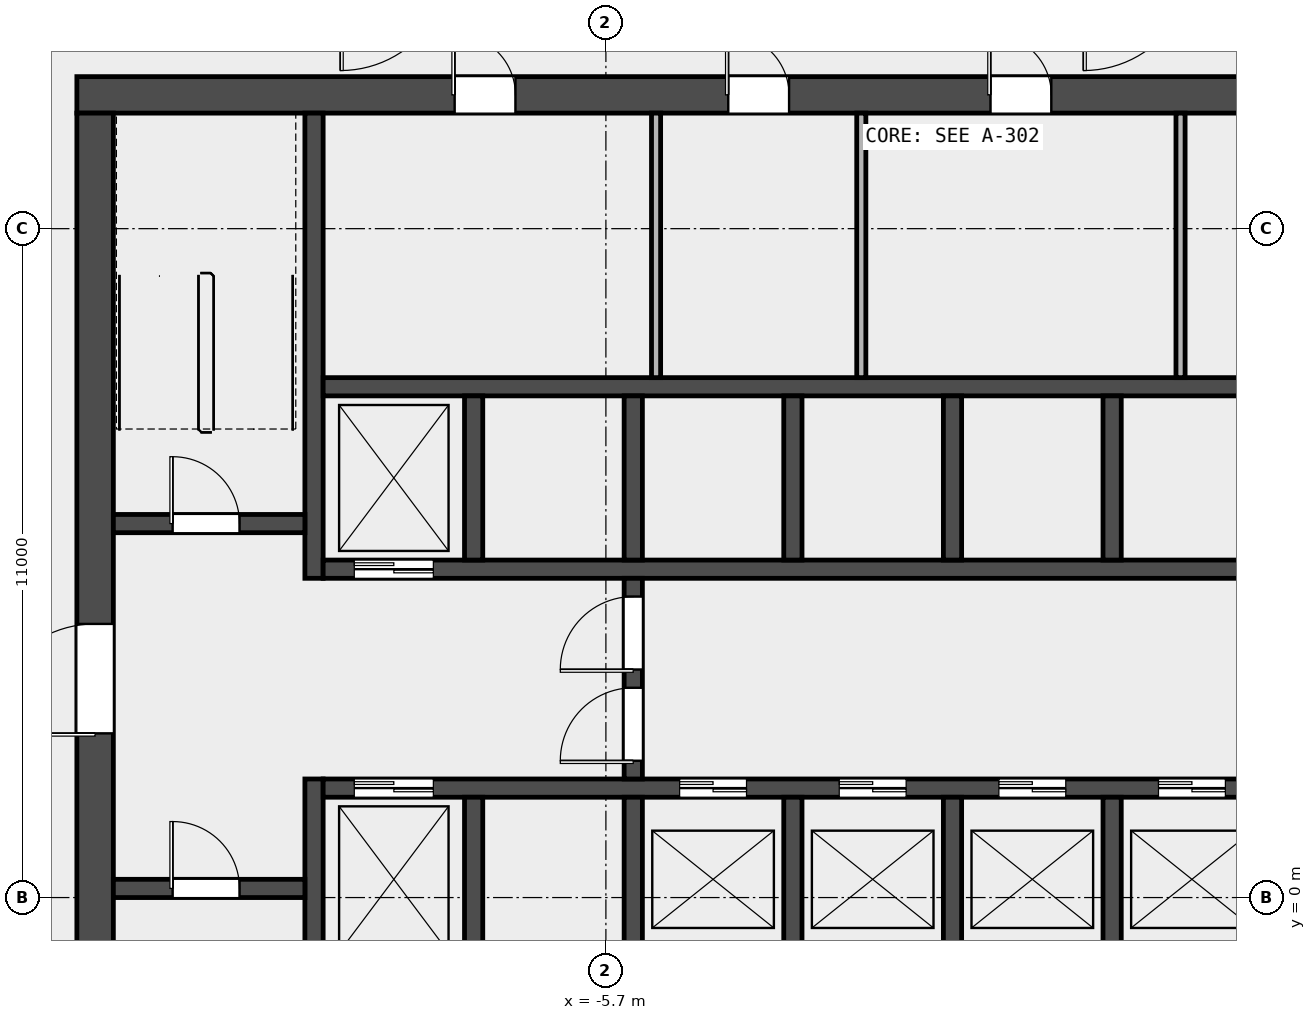
"""IFC4 building model, lengths in metres.
Left out: names, types, materials, properties, quantities, classifications, styles, units other than length and angle.
Written with IfcOpenShell. Run it as: python <this file> out.ifc"""

import sys

from ifc_helpers import new_model, si_unit, direction, frame, frame_2d, origin, place, context, subcontext, project, spatial, rectangle, extrude, element, fill, save


model = new_model("IFC4")
c1 = context("Model", 3, precision=1e-05, world=origin(), true_north=direction((0.0, 1.0)))
c2 = subcontext(c1, "Body", "Model", "MODEL_VIEW")
j1 = project(units=[si_unit("LENGTHUNIT", "METRE"), si_unit("PLANEANGLEUNIT", "RADIAN")], contexts=[c1])
p1 = place(None, origin())
s1 = spatial("IfcSite", under=j1, at=p1, CompositionType="ELEMENT")
p2 = place(p1, origin())
s2 = spatial("IfcBuilding", under=s1, at=p2, CompositionType="ELEMENT")
p3 = place(p2, frame((0.0, 0.0, 9.0)))
s3 = spatial("IfcBuildingStorey", under=s2, at=p3, CompositionType="ELEMENT", Elevation=9.0)
p4 = place(p3, frame((-14.4, 13.2, 0.0), z_axis=(0.0, 0.0, 1.0), x_axis=(1.0, 0.0, 0.0)))
e1 = element("IfcWall", 1, at=p4, inside=s3, PredefinedType="SHEAR", context=c2, shape_type="SweptSolid", body=[
    extrude(rectangle(XDim=28.8, YDim=0.6, at=frame_2d((14.4, 0.0))), origin(), (0.0, 0.0, 1.0), 5.2),
])
p5 = place(p4, frame((6.212, 0.0, 0.0)))
e2 = element("IfcOpeningElement", 2, at=p5, cuts=e1, PredefinedType="OPENING", context=c2, shape_type="SweptSolid", body=[
    extrude(rectangle(XDim=1.0, YDim=2.1, at=frame_2d((0.5, 1.05))), frame((0.0, 0.312, 0.0), z_axis=(0.0, -1.0, 0.0), x_axis=(1.0, 0.0, 0.0)), (0.0, 0.0, 1.0), 0.624),
])
p6 = place(p4, frame((10.712, 0.0, 0.0)))
e3 = element("IfcOpeningElement", 3, at=p6, cuts=e1, PredefinedType="OPENING", context=c2, shape_type="SweptSolid", body=[
    extrude(rectangle(XDim=1.0, YDim=2.1, at=frame_2d((0.5, 1.05))), frame((0.0, 0.312, 0.0), z_axis=(0.0, -1.0, 0.0), x_axis=(1.0, 0.0, 0.0)), (0.0, 0.0, 1.0), 0.624),
])
p7 = place(p4, frame((15.025, 0.0, 0.0)))
e4 = element("IfcOpeningElement", 4, at=p7, cuts=e1, PredefinedType="OPENING", context=c2, shape_type="SweptSolid", body=[
    extrude(rectangle(XDim=1.0, YDim=2.1, at=frame_2d((0.5, 1.05))), frame((0.0, 0.312, 0.0), z_axis=(0.0, -1.0, 0.0), x_axis=(1.0, 0.0, 0.0)), (0.0, 0.0, 1.0), 0.624),
])
p8 = place(p4, frame((21.025, 0.0, 0.0)))
e5 = element("IfcOpeningElement", 5, at=p8, cuts=e1, PredefinedType="OPENING", context=c2, shape_type="SweptSolid", body=[
    extrude(rectangle(XDim=1.0, YDim=2.1, at=frame_2d((0.5, 1.05))), frame((0.0, 0.312, 0.0), z_axis=(0.0, -1.0, 0.0), x_axis=(1.0, 0.0, 0.0)), (0.0, 0.0, 1.0), 0.624),
])
p9 = place(p3, frame((-14.1, -6.6, 0.0), z_axis=(0.0, 0.0, 1.0), x_axis=(0.0, 1.0, 0.0)))
e6 = element("IfcWall", 6, at=p9, inside=s3, PredefinedType="SHEAR", context=c2, shape_type="SweptSolid", body=[
    extrude(rectangle(XDim=19.5, YDim=0.6, at=frame_2d((9.75, 0.0))), origin(), (0.0, 0.0, 1.0), 5.2),
])
p10 = place(p9, frame((9.3, 0.0, 0.0)))
e7 = element("IfcOpeningElement", 7, at=p10, cuts=e6, PredefinedType="OPENING", context=c2, shape_type="SweptSolid", body=[
    extrude(rectangle(XDim=1.8, YDim=2.1, at=frame_2d((0.9, 1.05))), frame((0.0, 0.312, 0.0), z_axis=(0.0, -1.0, 0.0), x_axis=(1.0, 0.0, 0.0)), (0.0, 0.0, 1.0), 0.624),
])
p11 = place(p3, frame((-10.5, -6.6, 0.0), z_axis=(0.0, 0.0, 1.0), x_axis=(0.0, 1.0, 0.0)))
e8 = element("IfcWall", 8, at=p11, inside=s3, PredefinedType="SHEAR", context=c2, shape_type="SweptSolid", body=[
    extrude(rectangle(XDim=8.55, YDim=0.3, at=frame_2d((4.275, 0.0))), origin(), (0.0, 0.0, 1.0), 5.2),
])
p12 = place(p3, frame((-10.5, 5.25, 0.0), z_axis=(0.0, 0.0, 1.0), x_axis=(0.0, 1.0, 0.0)))
e9 = element("IfcWall", 9, at=p12, inside=s3, PredefinedType="SHEAR", context=c2, shape_type="SweptSolid", body=[
    extrude(rectangle(XDim=7.65, YDim=0.3, at=frame_2d((3.825, 0.0))), origin(), (0.0, 0.0, 1.0), 5.2),
])
p13 = place(p3, frame((-13.8, 0.15, 0.0), z_axis=(0.0, 0.0, 1.0), x_axis=(1.0, 0.0, 0.0)))
e10 = element("IfcWall", 10, at=p13, inside=s3, PredefinedType="SOLIDWALL", context=c2, shape_type="SweptSolid", body=[
    extrude(rectangle(XDim=3.15, YDim=0.3, at=frame_2d((1.575, 0.0))), origin(), (0.0, 0.0, 1.0), 5.2),
])
p14 = place(p13, frame((0.975, 0.0, 0.0)))
e11 = element("IfcOpeningElement", 11, at=p14, cuts=e10, PredefinedType="OPENING", context=c2, shape_type="SweptSolid", body=[
    extrude(rectangle(XDim=1.1, YDim=2.1, at=frame_2d((0.55, 1.05))), frame((0.0, 0.162, 0.0), z_axis=(0.0, -1.0, 0.0), x_axis=(1.0, 0.0, 0.0)), (0.0, 0.0, 1.0), 0.324),
])
p15 = place(p3, frame((-13.8, 6.15, 0.0), z_axis=(0.0, 0.0, 1.0), x_axis=(1.0, 0.0, 0.0)))
e12 = element("IfcWall", 12, at=p15, inside=s3, PredefinedType="SOLIDWALL", context=c2, shape_type="SweptSolid", body=[
    extrude(rectangle(XDim=3.15, YDim=0.3, at=frame_2d((1.575, 0.0))), origin(), (0.0, 0.0, 1.0), 5.2),
])
p16 = place(p15, frame((0.975, 0.0, 0.0)))
e13 = element("IfcOpeningElement", 13, at=p16, cuts=e12, PredefinedType="OPENING", context=c2, shape_type="SweptSolid", body=[
    extrude(rectangle(XDim=1.1, YDim=2.1, at=frame_2d((0.55, 1.05))), frame((0.0, 0.162, 0.0), z_axis=(0.0, -1.0, 0.0), x_axis=(1.0, 0.0, 0.0)), (0.0, 0.0, 1.0), 0.324),
])
p17 = place(p3, frame((-10.35, 1.8, 0.0), z_axis=(0.0, 0.0, 1.0), x_axis=(1.0, 0.0, 0.0)))
e14 = element("IfcWall", 14, at=p17, inside=s3, PredefinedType="SOLIDWALL", context=c2, shape_type="SweptSolid", body=[
    extrude(rectangle(XDim=20.7, YDim=0.3, at=frame_2d((10.35, 0.0))), origin(), (0.0, 0.0, 1.0), 5.2),
])
p18 = place(p17, frame((0.512, 0.0, 0.0)))
e15 = element("IfcOpeningElement", 15, at=p18, cuts=e14, PredefinedType="OPENING", context=c2, shape_type="SweptSolid", body=[
    extrude(rectangle(XDim=1.3, YDim=2.1, at=frame_2d((0.65, 1.05))), frame((0.0, 0.162, 0.0), z_axis=(0.0, -1.0, 0.0), x_axis=(1.0, 0.0, 0.0)), (0.0, 0.0, 1.0), 0.324),
])
p19 = place(p17, frame((5.863, 0.0, 0.0)))
e16 = element("IfcOpeningElement", 16, at=p19, cuts=e14, PredefinedType="OPENING", context=c2, shape_type="SweptSolid", body=[
    extrude(rectangle(XDim=1.1, YDim=2.1, at=frame_2d((0.55, 1.05))), frame((0.0, 0.162, 0.0), z_axis=(0.0, -1.0, 0.0), x_axis=(1.0, 0.0, 0.0)), (0.0, 0.0, 1.0), 0.324),
])
p20 = place(p17, frame((8.488, 0.0, 0.0)))
e17 = element("IfcOpeningElement", 17, at=p20, cuts=e14, PredefinedType="OPENING", context=c2, shape_type="SweptSolid", body=[
    extrude(rectangle(XDim=1.1, YDim=2.1, at=frame_2d((0.55, 1.05))), frame((0.0, 0.162, 0.0), z_axis=(0.0, -1.0, 0.0), x_axis=(1.0, 0.0, 0.0)), (0.0, 0.0, 1.0), 0.324),
])
p21 = place(p17, frame((11.113, 0.0, 0.0)))
e18 = element("IfcOpeningElement", 18, at=p21, cuts=e14, PredefinedType="OPENING", context=c2, shape_type="SweptSolid", body=[
    extrude(rectangle(XDim=1.1, YDim=2.1, at=frame_2d((0.55, 1.05))), frame((0.0, 0.162, 0.0), z_axis=(0.0, -1.0, 0.0), x_axis=(1.0, 0.0, 0.0)), (0.0, 0.0, 1.0), 0.324),
])
p22 = place(p17, frame((13.738, 0.0, 0.0)))
e19 = element("IfcOpeningElement", 19, at=p22, cuts=e14, PredefinedType="OPENING", context=c2, shape_type="SweptSolid", body=[
    extrude(rectangle(XDim=1.1, YDim=2.1, at=frame_2d((0.55, 1.05))), frame((0.0, 0.162, 0.0), z_axis=(0.0, -1.0, 0.0), x_axis=(1.0, 0.0, 0.0)), (0.0, 0.0, 1.0), 0.324),
])
p23 = place(p17, frame((16.363, 0.0, 0.0)))
e20 = element("IfcOpeningElement", 20, at=p23, cuts=e14, PredefinedType="OPENING", context=c2, shape_type="SweptSolid", body=[
    extrude(rectangle(XDim=1.1, YDim=2.1, at=frame_2d((0.55, 1.05))), frame((0.0, 0.162, 0.0), z_axis=(0.0, -1.0, 0.0), x_axis=(1.0, 0.0, 0.0)), (0.0, 0.0, 1.0), 0.324),
])
p24 = place(p17, frame((18.988, 0.0, 0.0)))
e21 = element("IfcOpeningElement", 21, at=p24, cuts=e14, PredefinedType="OPENING", context=c2, shape_type="SweptSolid", body=[
    extrude(rectangle(XDim=1.1, YDim=2.1, at=frame_2d((0.55, 1.05))), frame((0.0, 0.162, 0.0), z_axis=(0.0, -1.0, 0.0), x_axis=(1.0, 0.0, 0.0)), (0.0, 0.0, 1.0), 0.324),
])
p25 = place(p3, frame((-10.35, 5.4, 0.0), z_axis=(0.0, 0.0, 1.0), x_axis=(1.0, 0.0, 0.0)))
e22 = element("IfcWall", 22, at=p25, inside=s3, PredefinedType="SOLIDWALL", context=c2, shape_type="SweptSolid", body=[
    extrude(rectangle(XDim=20.7, YDim=0.3, at=frame_2d((10.35, 0.0))), origin(), (0.0, 0.0, 1.0), 5.2),
])
p26 = place(p25, frame((0.512, 0.0, 0.0)))
e23 = element("IfcOpeningElement", 23, at=p26, cuts=e22, PredefinedType="OPENING", context=c2, shape_type="SweptSolid", body=[
    extrude(rectangle(XDim=1.3, YDim=2.1, at=frame_2d((0.65, 1.05))), frame((0.0, 0.162, 0.0), z_axis=(0.0, -1.0, 0.0), x_axis=(1.0, 0.0, 0.0)), (0.0, 0.0, 1.0), 0.324),
])
p27 = place(p3, frame((-10.35, 8.4, 0.0), z_axis=(0.0, 0.0, 1.0), x_axis=(1.0, 0.0, 0.0)))
e24 = element("IfcWall", 24, at=p27, inside=s3, PredefinedType="SOLIDWALL", context=c2, shape_type="SweptSolid", body=[
    extrude(rectangle(XDim=20.7, YDim=0.3, at=frame_2d((10.35, 0.0))), origin(), (0.0, 0.0, 1.0), 5.2),
])
for number, where, z_axis, x_axis in (
    (25, (-7.875, -1.05, 0.0), (0.0, 0.0, 1.0), (0.0, 1.0, 0.0)),
    (26, (-5.25, -1.05, 0.0), (0.0, 0.0, 1.0), (0.0, 1.0, 0.0)),
    (27, (-2.625, -1.05, 0.0), (0.0, 0.0, 1.0), (0.0, 1.0, 0.0)),
    (28, (0.0, -1.05, 0.0), (0.0, 0.0, 1.0), (0.0, 1.0, 0.0)),
    (29, (2.625, -1.05, 0.0), (0.0, 0.0, 1.0), (0.0, 1.0, 0.0)),
    (30, (-7.875, 5.55, 0.0), (0.0, 0.0, 1.0), (0.0, 1.0, 0.0)),
    (31, (-5.25, 5.55, 0.0), (0.0, 0.0, 1.0), (0.0, 1.0, 0.0)),
    (32, (-2.625, 5.55, 0.0), (0.0, 0.0, 1.0), (0.0, 1.0, 0.0)),
    (33, (0.0, 5.55, 0.0), (0.0, 0.0, 1.0), (0.0, 1.0, 0.0)),
    (34, (2.625, 5.55, 0.0), (0.0, 0.0, 1.0), (0.0, 1.0, 0.0)),
):
    element("IfcWall", number, at=place(p3, frame(where, z_axis=z_axis, x_axis=x_axis)), inside=s3, PredefinedType="SOLIDWALL", context=c2, shape_type="SweptSolid", body=[
        extrude(rectangle(XDim=2.7, YDim=0.3, at=frame_2d((1.35, 0.0))), origin(), (0.0, 0.0, 1.0), 5.2),
    ])
p28 = place(p3, frame((-5.25, 1.95, 0.0), z_axis=(0.0, 0.0, 1.0), x_axis=(0.0, 1.0, 0.0)))
e35 = element("IfcWall", 35, at=p28, inside=s3, PredefinedType="SOLIDWALL", context=c2, shape_type="SweptSolid", body=[
    extrude(rectangle(XDim=3.3, YDim=0.3, at=frame_2d((1.65, 0.0))), origin(), (0.0, 0.0, 1.0), 5.2),
])
p29 = place(p28, frame((0.3, 0.0, 0.0)))
e36 = element("IfcOpeningElement", 36, at=p29, cuts=e35, PredefinedType="OPENING", context=c2, shape_type="SweptSolid", body=[
    extrude(rectangle(XDim=1.2, YDim=2.1, at=frame_2d((0.6, 1.05))), frame((0.0, 0.162, 0.0), z_axis=(0.0, -1.0, 0.0), x_axis=(1.0, 0.0, 0.0)), (0.0, 0.0, 1.0), 0.324),
])
p30 = place(p28, frame((1.8, 0.0, 0.0)))
e37 = element("IfcOpeningElement", 37, at=p30, cuts=e35, PredefinedType="OPENING", context=c2, shape_type="SweptSolid", body=[
    extrude(rectangle(XDim=1.2, YDim=2.1, at=frame_2d((0.6, 1.05))), frame((0.0, 0.162, 0.0), z_axis=(0.0, -1.0, 0.0), x_axis=(1.0, 0.0, 0.0)), (0.0, 0.0, 1.0), 0.324),
])
for number, where, z_axis, x_axis in (
    (38, (-4.875, 8.55, 0.0), (0.0, 0.0, 1.0), (0.0, 1.0, 0.0)),
    (39, (-1.5, 8.55, 0.0), (0.0, 0.0, 1.0), (0.0, 1.0, 0.0)),
    (40, (3.75, 8.55, 0.0), (0.0, 0.0, 1.0), (0.0, 1.0, 0.0)),
):
    element("IfcWall", number, at=place(p3, frame(where, z_axis=z_axis, x_axis=x_axis)), inside=s3, PredefinedType="PARTITIONING", context=c2, shape_type="SweptSolid", body=[
        extrude(rectangle(XDim=4.35, YDim=0.15, at=frame_2d((2.175, 0.0))), origin(), (0.0, 0.0, 1.0), 5.2),
    ])
p31 = place(p14, origin())
e41 = element("IfcDoor", 41, at=p31, inside=s3, OperationType="SINGLE_SWING_LEFT", PredefinedType="DOOR", context=c2, shape_type="SweptSolid", body=[
    extrude(rectangle(XDim=1.1, YDim=2.1, at=frame_2d((0.55, 1.05))), frame((0.0, 0.025, 0.0), z_axis=(0.0, -1.0, 0.0), x_axis=(1.0, 0.0, 0.0)), (0.0, 0.0, 1.0), 0.05),
])
fill(e11, e41)
p32 = place(p16, origin())
e42 = element("IfcDoor", 42, at=p32, inside=s3, OperationType="SINGLE_SWING_LEFT", PredefinedType="DOOR", context=c2, shape_type="SweptSolid", body=[
    extrude(rectangle(XDim=1.1, YDim=2.1, at=frame_2d((0.55, 1.05))), frame((0.0, 0.025, 0.0), z_axis=(0.0, -1.0, 0.0), x_axis=(1.0, 0.0, 0.0)), (0.0, 0.0, 1.0), 0.05),
])
fill(e13, e42)
p33 = place(p10, origin())
e43 = element("IfcDoor", 43, at=p33, inside=s3, OperationType="DOUBLE_DOOR_SINGLE_SWING", PredefinedType="DOOR", context=c2, shape_type="SweptSolid", body=[
    extrude(rectangle(XDim=1.8, YDim=2.1, at=frame_2d((0.9, 1.05))), frame((0.0, 0.025, 0.0), z_axis=(0.0, -1.0, 0.0), x_axis=(1.0, 0.0, 0.0)), (0.0, 0.0, 1.0), 0.05),
])
fill(e7, e43)
p34 = place(p29, origin())
e44 = element("IfcDoor", 44, at=p34, inside=s3, OperationType="SINGLE_SWING_LEFT", PredefinedType="DOOR", context=c2, shape_type="SweptSolid", body=[
    extrude(rectangle(XDim=1.2, YDim=2.1, at=frame_2d((0.6, 1.05))), frame((0.0, 0.025, 0.0), z_axis=(0.0, -1.0, 0.0), x_axis=(1.0, 0.0, 0.0)), (0.0, 0.0, 1.0), 0.05),
])
fill(e36, e44)
p35 = place(p30, origin())
e45 = element("IfcDoor", 45, at=p35, inside=s3, OperationType="SINGLE_SWING_RIGHT", PredefinedType="DOOR", context=c2, shape_type="SweptSolid", body=[
    extrude(rectangle(XDim=1.2, YDim=2.1, at=frame_2d((0.6, 1.05))), frame((0.0, 0.025, 0.0), z_axis=(0.0, -1.0, 0.0), x_axis=(1.0, 0.0, 0.0)), (0.0, 0.0, 1.0), 0.05),
])
fill(e37, e45)
p36 = place(p18, origin())
e46 = element("IfcDoor", 46, at=p36, inside=s3, OperationType="DOUBLE_DOOR_SLIDING", PredefinedType="DOOR", context=c2, shape_type="SweptSolid", body=[
    extrude(rectangle(XDim=1.3, YDim=2.1, at=frame_2d((0.65, 1.05))), frame((0.0, 0.025, 0.0), z_axis=(0.0, -1.0, 0.0), x_axis=(1.0, 0.0, 0.0)), (0.0, 0.0, 1.0), 0.05),
])
fill(e15, e46)
p37 = place(p19, origin())
e47 = element("IfcDoor", 47, at=p37, inside=s3, OperationType="DOUBLE_DOOR_SLIDING", PredefinedType="DOOR", context=c2, shape_type="SweptSolid", body=[
    extrude(rectangle(XDim=1.1, YDim=2.1, at=frame_2d((0.55, 1.05))), frame((0.0, 0.025, 0.0), z_axis=(0.0, -1.0, 0.0), x_axis=(1.0, 0.0, 0.0)), (0.0, 0.0, 1.0), 0.05),
])
fill(e16, e47)
p38 = place(p20, origin())
e48 = element("IfcDoor", 48, at=p38, inside=s3, OperationType="DOUBLE_DOOR_SLIDING", PredefinedType="DOOR", context=c2, shape_type="SweptSolid", body=[
    extrude(rectangle(XDim=1.1, YDim=2.1, at=frame_2d((0.55, 1.05))), frame((0.0, 0.025, 0.0), z_axis=(0.0, -1.0, 0.0), x_axis=(1.0, 0.0, 0.0)), (0.0, 0.0, 1.0), 0.05),
])
fill(e17, e48)
p39 = place(p21, origin())
e49 = element("IfcDoor", 49, at=p39, inside=s3, OperationType="DOUBLE_DOOR_SLIDING", PredefinedType="DOOR", context=c2, shape_type="SweptSolid", body=[
    extrude(rectangle(XDim=1.1, YDim=2.1, at=frame_2d((0.55, 1.05))), frame((0.0, 0.025, 0.0), z_axis=(0.0, -1.0, 0.0), x_axis=(1.0, 0.0, 0.0)), (0.0, 0.0, 1.0), 0.05),
])
fill(e18, e49)
p40 = place(p22, origin())
e50 = element("IfcDoor", 50, at=p40, inside=s3, OperationType="DOUBLE_DOOR_SLIDING", PredefinedType="DOOR", context=c2, shape_type="SweptSolid", body=[
    extrude(rectangle(XDim=1.1, YDim=2.1, at=frame_2d((0.55, 1.05))), frame((0.0, 0.025, 0.0), z_axis=(0.0, -1.0, 0.0), x_axis=(1.0, 0.0, 0.0)), (0.0, 0.0, 1.0), 0.05),
])
fill(e19, e50)
p41 = place(p26, origin())
e51 = element("IfcDoor", 51, at=p41, inside=s3, OperationType="DOUBLE_DOOR_SLIDING", PredefinedType="DOOR", context=c2, shape_type="SweptSolid", body=[
    extrude(rectangle(XDim=1.3, YDim=2.1, at=frame_2d((0.65, 1.05))), frame((0.0, 0.025, 0.0), z_axis=(0.0, -1.0, 0.0), x_axis=(1.0, 0.0, 0.0)), (0.0, 0.0, 1.0), 0.05),
])
fill(e23, e51)
p42 = place(p5, origin())
e52 = element("IfcDoor", 52, at=p42, inside=s3, OperationType="SINGLE_SWING_LEFT", PredefinedType="DOOR", context=c2, shape_type="SweptSolid", body=[
    extrude(rectangle(XDim=1.0, YDim=2.1, at=frame_2d((0.5, 1.05))), frame((0.0, 0.025, 0.0), z_axis=(0.0, -1.0, 0.0), x_axis=(1.0, 0.0, 0.0)), (0.0, 0.0, 1.0), 0.05),
])
fill(e2, e52)
p43 = place(p6, origin())
e53 = element("IfcDoor", 53, at=p43, inside=s3, OperationType="SINGLE_SWING_LEFT", PredefinedType="DOOR", context=c2, shape_type="SweptSolid", body=[
    extrude(rectangle(XDim=1.0, YDim=2.1, at=frame_2d((0.5, 1.05))), frame((0.0, 0.025, 0.0), z_axis=(0.0, -1.0, 0.0), x_axis=(1.0, 0.0, 0.0)), (0.0, 0.0, 1.0), 0.05),
])
fill(e3, e53)
p44 = place(p7, origin())
e54 = element("IfcDoor", 54, at=p44, inside=s3, OperationType="SINGLE_SWING_LEFT", PredefinedType="DOOR", context=c2, shape_type="SweptSolid", body=[
    extrude(rectangle(XDim=1.0, YDim=2.1, at=frame_2d((0.5, 1.05))), frame((0.0, 0.025, 0.0), z_axis=(0.0, -1.0, 0.0), x_axis=(1.0, 0.0, 0.0)), (0.0, 0.0, 1.0), 0.05),
])
fill(e4, e54)
save(model, sys.argv[1])
